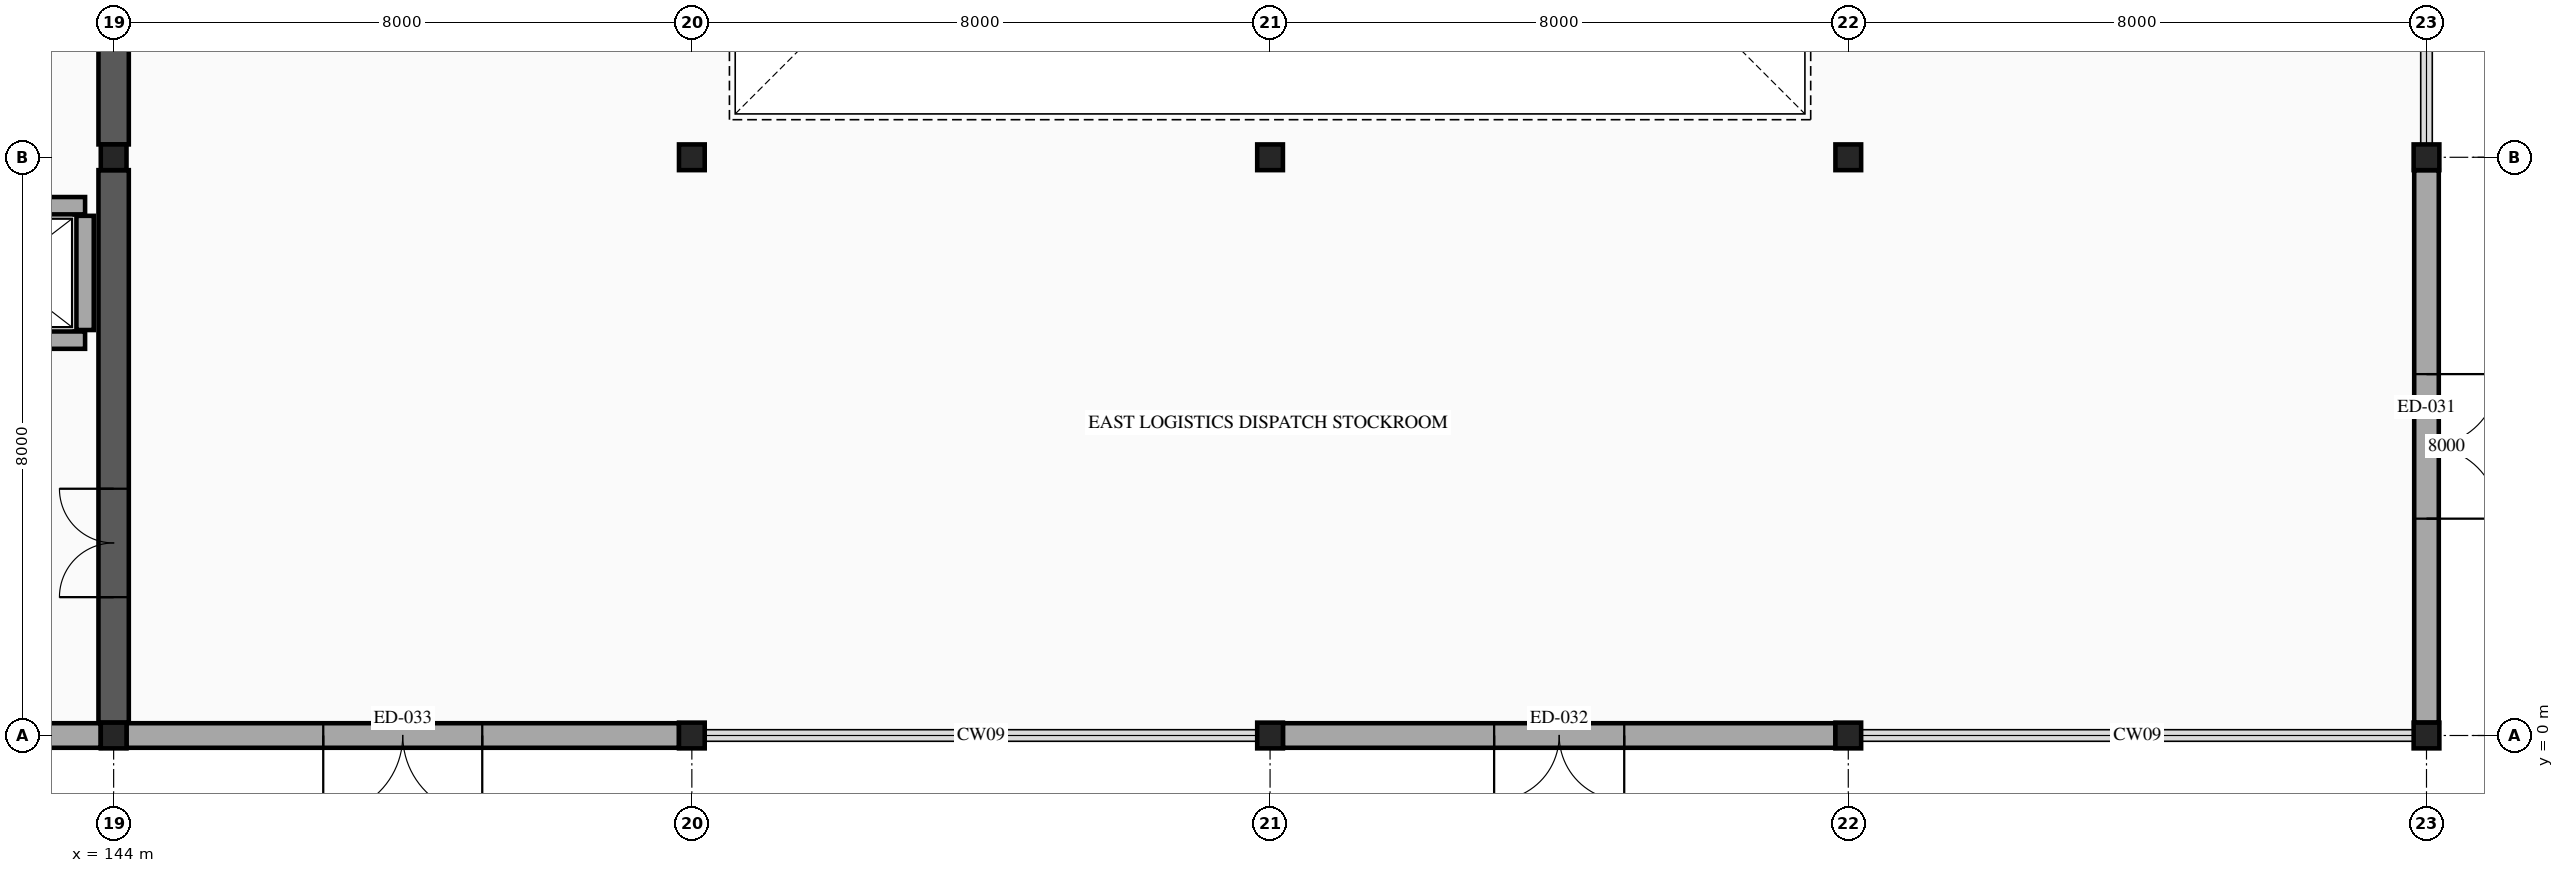
"""IFC4 building model, lengths in metres.
Left out: names, types, materials, properties, quantities, classifications, styles, units other than length and angle.
Written with IfcOpenShell. Run it as: python <this file> out.ifc"""

import sys

from ifc_helpers import new_model, si_unit, direction, frame, frame_2d, origin, origin_2d, place, context, subcontext, project, spatial, rectangle, hollow_rectangle, extrude, element, fill, save


model = new_model("IFC4")
c1 = context("Model", 3, precision=1e-05, world=origin(), true_north=direction((0.0, 1.0)))
c2 = subcontext(c1, "Body", "Model", "MODEL_VIEW")
j1 = project(units=[si_unit("LENGTHUNIT", "METRE"), si_unit("PLANEANGLEUNIT", "RADIAN")], contexts=[c1])
p1 = place(None, origin())
s1 = spatial("IfcSite", under=j1, at=p1, CompositionType="ELEMENT")
p2 = place(p1, origin())
s2 = spatial("IfcBuilding", under=s1, at=p2, CompositionType="ELEMENT")
p3 = place(p2, origin())
s3 = spatial("IfcBuildingStorey", under=s2, at=p3, CompositionType="ELEMENT", Elevation=0.0)
for number, where, z_axis, x_axis in (
    (1, (144.0, 0.0, 0.0), (0.0, 0.0, 1.0), (1.0, 0.0, 0.0)),
    (2, (144.0, 8.0, 0.0), (0.0, 0.0, 1.0), (1.0, 0.0, 0.0)),
    (3, (152.0, 0.0, 0.0), (0.0, 0.0, 1.0), (1.0, 0.0, 0.0)),
    (4, (152.0, 8.0, 0.0), (0.0, 0.0, 1.0), (1.0, 0.0, 0.0)),
    (5, (160.0, 0.0, 0.0), (0.0, 0.0, 1.0), (1.0, 0.0, 0.0)),
    (6, (160.0, 8.0, 0.0), (0.0, 0.0, 1.0), (1.0, 0.0, 0.0)),
    (7, (168.0, 0.0, 0.0), (0.0, 0.0, 1.0), (1.0, 0.0, 0.0)),
    (8, (168.0, 8.0, 0.0), (0.0, 0.0, 1.0), (1.0, 0.0, 0.0)),
    (9, (176.0, 0.0, 0.0), (0.0, 0.0, 1.0), (1.0, 0.0, 0.0)),
    (10, (176.0, 8.0, 0.0), (0.0, 0.0, 1.0), (1.0, 0.0, 0.0)),
):
    element("IfcColumn", number, at=place(p3, frame(where, z_axis=z_axis, x_axis=x_axis)), inside=s3, PredefinedType="COLUMN", context=c2, shape_type="SweptSolid", body=[
        extrude(hollow_rectangle(XDim=0.356, YDim=0.356, WallThickness=0.012, InnerFilletRadius=0.012, OuterFilletRadius=0.024, at=origin_2d()), origin(), (0.0, 0.0, 1.0), 5.6),
    ])
p4 = place(p3, frame((176.0, 7.822, 0.0), z_axis=(0.0, 0.0, 1.0), x_axis=(0.0, -1.0, 0.0)))
e11 = element("IfcWall", 11, at=p4, inside=s3, PredefinedType="STANDARD", context=c2, shape_type="SweptSolid", body=[
    extrude(rectangle(XDim=7.644, YDim=0.34, at=frame_2d((3.822, 0.0))), origin(), (0.0, 0.0, 1.0), 4.58),
])
p5 = place(p4, frame((2.822, 0.0, 0.0)))
e12 = element("IfcOpeningElement", 12, at=p5, cuts=e11, PredefinedType="OPENING", context=c2, shape_type="SweptSolid", body=[
    extrude(rectangle(XDim=2.0, YDim=2.35, at=frame_2d((1.0, 1.175))), frame((0.0, 0.18, 0.0), z_axis=(0.0, -1.0, 0.0), x_axis=(1.0, 0.0, 0.0)), (0.0, 0.0, 1.0), 0.36),
])
p6 = place(p3, frame((167.822, 0.0, 0.0), z_axis=(0.0, 0.0, 1.0), x_axis=(-1.0, 0.0, 0.0)))
e13 = element("IfcWall", 13, at=p6, inside=s3, PredefinedType="STANDARD", context=c2, shape_type="SweptSolid", body=[
    extrude(rectangle(XDim=7.644, YDim=0.34, at=frame_2d((3.822, 0.0))), origin(), (0.0, 0.0, 1.0), 4.58),
])
p7 = place(p6, frame((2.922, 0.0, 0.0)))
e14 = element("IfcOpeningElement", 14, at=p7, cuts=e13, PredefinedType="OPENING", context=c2, shape_type="SweptSolid", body=[
    extrude(rectangle(XDim=1.8, YDim=2.3, at=frame_2d((0.9, 1.15))), frame((0.0, 0.18, 0.0), z_axis=(0.0, -1.0, 0.0), x_axis=(1.0, 0.0, 0.0)), (0.0, 0.0, 1.0), 0.36),
])
p8 = place(p3, frame((151.822, 0.0, 0.0), z_axis=(0.0, 0.0, 1.0), x_axis=(-1.0, 0.0, 0.0)))
e15 = element("IfcWall", 15, at=p8, inside=s3, PredefinedType="STANDARD", context=c2, shape_type="SweptSolid", body=[
    extrude(rectangle(XDim=7.644, YDim=0.34, at=frame_2d((3.822, 0.0))), origin(), (0.0, 0.0, 1.0), 4.58),
])
p9 = place(p8, frame((2.722, 0.0, 0.0)))
e16 = element("IfcOpeningElement", 16, at=p9, cuts=e15, PredefinedType="OPENING", context=c2, shape_type="SweptSolid", body=[
    extrude(rectangle(XDim=2.2, YDim=2.45, at=frame_2d((1.1, 1.225))), frame((0.0, 0.18, 0.0), z_axis=(0.0, -1.0, 0.0), x_axis=(1.0, 0.0, 0.0)), (0.0, 0.0, 1.0), 0.36),
])
p10 = place(p3, frame((143.822, 0.0, 0.0), z_axis=(0.0, 0.0, 1.0), x_axis=(-1.0, 0.0, 0.0)))
e17 = element("IfcWall", 17, at=p10, inside=s3, PredefinedType="STANDARD", context=c2, shape_type="SweptSolid", body=[
    extrude(rectangle(XDim=7.619, YDim=0.34, at=frame_2d((3.81, 0.0))), origin(), (0.0, 0.0, 1.0), 4.58),
])
p11 = place(p10, frame((4.919, 0.0, 0.0)))
e18 = element("IfcOpeningElement", 18, at=p11, cuts=e17, PredefinedType="OPENING", context=c2, shape_type="SweptSolid", body=[
    extrude(rectangle(XDim=1.7, YDim=2.15, at=frame_2d((0.85, 1.075))), frame((0.0, 0.18, 0.0), z_axis=(0.0, -1.0, 0.0), x_axis=(1.0, 0.0, 0.0)), (0.0, 0.0, 1.0), 0.36),
])
p12 = place(p3, frame((144.0, 0.178, 0.0), z_axis=(0.0, 0.0, 1.0), x_axis=(0.0, 1.0, 0.0)))
e19 = element("IfcWall", 19, at=p12, inside=s3, PredefinedType="SHEAR", context=c2, shape_type="SweptSolid", body=[
    extrude(rectangle(XDim=7.644, YDim=0.42, at=frame_2d((3.822, 0.0))), origin(), (0.0, 0.0, 1.0), 5.38),
])
p13 = place(p12, frame((1.736, 0.0, 0.0)))
e20 = element("IfcOpeningElement", 20, at=p13, cuts=e19, PredefinedType="OPENING", context=c2, shape_type="SweptSolid", body=[
    extrude(rectangle(XDim=1.5, YDim=2.15, at=frame_2d((0.75, 1.075))), frame((0.0, 0.22, 0.0), z_axis=(0.0, -1.0, 0.0), x_axis=(1.0, 0.0, 0.0)), (0.0, 0.0, 1.0), 0.44),
])
p14 = place(p3, frame((144.0, 8.178, 0.0), z_axis=(0.0, 0.0, 1.0), x_axis=(0.0, 1.0, 0.0)))
e21 = element("IfcWall", 21, at=p14, inside=s3, PredefinedType="SHEAR", context=c2, shape_type="SweptSolid", body=[
    extrude(rectangle(XDim=7.644, YDim=0.42, at=frame_2d((3.822, 0.0))), origin(), (0.0, 0.0, 1.0), 5.38),
])
p15 = place(p14, frame((4.258, 0.0, 0.0)))
e22 = element("IfcOpeningElement", 22, at=p15, cuts=e21, PredefinedType="OPENING", context=c2, shape_type="SweptSolid", body=[
    extrude(rectangle(XDim=1.5, YDim=2.15, at=frame_2d((0.75, 1.075))), frame((0.0, 0.22, 0.0), z_axis=(0.0, -1.0, 0.0), x_axis=(1.0, 0.0, 0.0)), (0.0, 0.0, 1.0), 0.44),
])
p16 = place(p3, frame((141.295, 7.33, 0.0), z_axis=(0.0, 0.0, 1.0), x_axis=(1.0, 0.0, 0.0)))
e23 = element("IfcWall", 23, at=p16, inside=s3, PredefinedType="PARTITIONING", context=c2, shape_type="SweptSolid", body=[
    extrude(rectangle(XDim=2.31, YDim=0.24, at=frame_2d((1.155, 0.0))), origin(), (0.0, 0.0, 1.0), 5.38),
])
p17 = place(p16, frame((0.605, 0.0, 0.0)))
e24 = element("IfcOpeningElement", 24, at=p17, cuts=e23, PredefinedType="OPENING", context=c2, shape_type="SweptSolid", body=[
    extrude(rectangle(XDim=1.1, YDim=2.15, at=frame_2d((0.55, 1.075))), frame((0.0, 0.13, 0.0), z_axis=(0.0, -1.0, 0.0), x_axis=(1.0, 0.0, 0.0)), (0.0, 0.0, 1.0), 0.26),
])
p18 = place(p3, frame((141.295, 5.47, 0.0), z_axis=(0.0, 0.0, 1.0), x_axis=(1.0, 0.0, 0.0)))
e25 = element("IfcWall", 25, at=p18, inside=s3, PredefinedType="PARTITIONING", context=c2, shape_type="SweptSolid", body=[
    extrude(rectangle(XDim=2.31, YDim=0.24, at=frame_2d((1.155, 0.0))), origin(), (0.0, 0.0, 1.0), 5.38),
])
p19 = place(p3, frame((143.605, 5.61, 0.0), z_axis=(0.0, 0.0, 1.0), x_axis=(0.0, 1.0, 0.0)))
e26 = element("IfcWall", 26, at=p19, inside=s3, PredefinedType="PARTITIONING", context=c2, shape_type="SweptSolid", body=[
    extrude(rectangle(XDim=1.58, YDim=0.24, at=frame_2d((0.79, 0.0))), origin(), (0.0, 0.0, 1.0), 5.38),
])
p20 = place(p5, origin())
e27 = element("IfcDoor", 27, at=p20, inside=s3, OperationType="DOUBLE_DOOR_SINGLE_SWING", PredefinedType="DOOR", context=c2, shape_type="SweptSolid", body=[
    extrude(rectangle(XDim=2.0, YDim=2.35, at=frame_2d((1.0, 1.175))), frame((0.0, 0.025, 0.0), z_axis=(0.0, -1.0, 0.0), x_axis=(1.0, 0.0, 0.0)), (0.0, 0.0, 1.0), 0.05),
])
fill(e12, e27)
p21 = place(p7, origin())
e28 = element("IfcDoor", 28, at=p21, inside=s3, OperationType="DOUBLE_DOOR_SINGLE_SWING", PredefinedType="DOOR", context=c2, shape_type="SweptSolid", body=[
    extrude(rectangle(XDim=1.8, YDim=2.3, at=frame_2d((0.9, 1.15))), frame((0.0, 0.025, 0.0), z_axis=(0.0, -1.0, 0.0), x_axis=(1.0, 0.0, 0.0)), (0.0, 0.0, 1.0), 0.05),
])
fill(e14, e28)
p22 = place(p9, origin())
e29 = element("IfcDoor", 29, at=p22, inside=s3, OperationType="DOUBLE_DOOR_SINGLE_SWING", PredefinedType="DOOR", context=c2, shape_type="SweptSolid", body=[
    extrude(rectangle(XDim=2.2, YDim=2.45, at=frame_2d((1.1, 1.225))), frame((0.0, 0.025, 0.0), z_axis=(0.0, -1.0, 0.0), x_axis=(1.0, 0.0, 0.0)), (0.0, 0.0, 1.0), 0.05),
])
fill(e16, e29)
p23 = place(p13, origin())
e30 = element("IfcDoor", 30, at=p23, inside=s3, OperationType="DOUBLE_DOOR_SINGLE_SWING", PredefinedType="DOOR", context=c2, shape_type="SweptSolid", body=[
    extrude(rectangle(XDim=1.5, YDim=2.15, at=frame_2d((0.75, 1.075))), frame((0.0, 0.025, 0.0), z_axis=(0.0, -1.0, 0.0), x_axis=(1.0, 0.0, 0.0)), (0.0, 0.0, 1.0), 0.05),
])
fill(e20, e30)
save(model, sys.argv[1])
